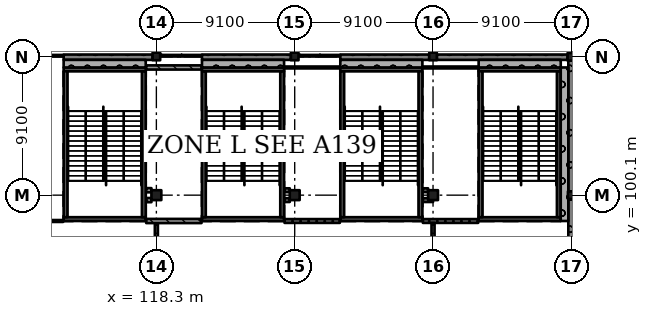
"""IFC4 building model, lengths in metres.
Left out: names, types, materials, properties, quantities, classifications, styles, units other than length and angle.
Written with IfcOpenShell. Run it as: python <this file> out.ifc"""

import sys

from ifc_helpers import new_model, si_unit, direction, frame, frame_2d, origin, origin_2d, place, context, subcontext, project, spatial, rectangle, extrude, element, fill, save


model = new_model("IFC4")
c1 = context("Model", 3, precision=1e-05, world=origin(), true_north=direction((0.0, 1.0)))
c2 = subcontext(c1, "Body", "Model", "MODEL_VIEW")
j1 = project(units=[si_unit("LENGTHUNIT", "METRE"), si_unit("PLANEANGLEUNIT", "RADIAN")], contexts=[c1])
p1 = place(None, origin())
s1 = spatial("IfcSite", under=j1, at=p1, CompositionType="ELEMENT")
p2 = place(p1, origin())
s2 = spatial("IfcBuilding", under=s1, at=p2, CompositionType="ELEMENT")
p3 = place(p2, frame((0.0, 0.0, 10.92)))
s3 = spatial("IfcBuildingStorey", under=s2, at=p3, CompositionType="ELEMENT", Elevation=10.92)
p4 = place(p3, frame((118.3, 100.1, 0.0), z_axis=(0.0, 0.0, 1.0), x_axis=(1.0, 0.0, 0.0)))
e1 = element("IfcColumn", 1, at=p4, inside=s3, PredefinedType="COLUMN", context=c2, shape_type="SweptSolid", body=[
    extrude(rectangle(XDim=0.65, YDim=0.65, at=origin_2d()), origin(), (0.0, 0.0, 1.0), 4.55),
])
p5 = place(p3, frame((118.3, 109.225, 0.0), z_axis=(0.0, 0.0, 1.0), x_axis=(1.0, 0.0, 0.0)))
e2 = element("IfcColumn", 2, at=p5, inside=s3, PredefinedType="COLUMN", context=c2, shape_type="SweptSolid", body=[
    extrude(rectangle(XDim=0.5, YDim=0.5, at=origin_2d()), origin(), (0.0, 0.0, 1.0), 4.55),
])
p6 = place(p3, frame((127.4, 100.1, 0.0), z_axis=(0.0, 0.0, 1.0), x_axis=(1.0, 0.0, 0.0)))
e3 = element("IfcColumn", 3, at=p6, inside=s3, PredefinedType="COLUMN", context=c2, shape_type="SweptSolid", body=[
    extrude(rectangle(XDim=0.65, YDim=0.65, at=origin_2d()), origin(), (0.0, 0.0, 1.0), 4.55),
])
p7 = place(p3, frame((127.4, 109.225, 0.0), z_axis=(0.0, 0.0, 1.0), x_axis=(1.0, 0.0, 0.0)))
e4 = element("IfcColumn", 4, at=p7, inside=s3, PredefinedType="COLUMN", context=c2, shape_type="SweptSolid", body=[
    extrude(rectangle(XDim=0.5, YDim=0.5, at=origin_2d()), origin(), (0.0, 0.0, 1.0), 4.55),
])
p8 = place(p3, frame((136.5, 100.1, 0.0), z_axis=(0.0, 0.0, 1.0), x_axis=(1.0, 0.0, 0.0)))
e5 = element("IfcColumn", 5, at=p8, inside=s3, PredefinedType="COLUMN", context=c2, shape_type="SweptSolid", body=[
    extrude(rectangle(XDim=0.65, YDim=0.65, at=origin_2d()), origin(), (0.0, 0.0, 1.0), 4.55),
])
for number, where, z_axis, x_axis in (
    (6, (136.5, 109.225, 0.0), (0.0, 0.0, 1.0), (1.0, 0.0, 0.0)),
    (7, (145.625, 100.1, 0.0), (0.0, 0.0, 1.0), (1.0, 0.0, 0.0)),
    (8, (145.6, 109.2, 0.0), (0.0, 0.0, 1.0), (1.0, 0.0, 0.0)),
):
    element("IfcColumn", number, at=place(p3, frame(where, z_axis=z_axis, x_axis=x_axis)), inside=s3, PredefinedType="COLUMN", context=c2, shape_type="SweptSolid", body=[
        extrude(rectangle(XDim=0.5, YDim=0.5, at=origin_2d()), origin(), (0.0, 0.0, 1.0), 4.55),
    ])
p9 = place(p3, frame((144.9, 98.525, 0.0), z_axis=(0.0, 0.0, 1.0), x_axis=(-1.0, 0.0, 0.0)))
e9 = element("IfcWall", 9, at=p9, inside=s3, PredefinedType="SHEAR", context=c2, shape_type="SweptSolid", body=[
    extrude(rectangle(XDim=5.4, YDim=0.25, at=frame_2d((2.7, 0.0))), origin(), (0.0, 0.0, 1.0), 4.55),
])
p10 = place(p9, frame((1.5, 0.0, 0.0)))
e10 = element("IfcOpeningElement", 10, at=p10, cuts=e9, PredefinedType="OPENING", context=c2, shape_type="SweptSolid", body=[
    extrude(rectangle(XDim=2.4, YDim=2.1, at=frame_2d((1.2, 1.05))), frame((0.0, 0.135, 0.0), z_axis=(0.0, -1.0, 0.0), x_axis=(1.0, 0.0, 0.0)), (0.0, 0.0, 1.0), 0.27),
])
p11 = place(p3, frame((144.9, 108.375, 0.0), z_axis=(0.0, 0.0, 1.0), x_axis=(-1.0, 0.0, 0.0)))
e11 = element("IfcWall", 11, at=p11, inside=s3, PredefinedType="SHEAR", context=c2, shape_type="SweptSolid", body=[
    extrude(rectangle(XDim=5.4, YDim=0.25, at=frame_2d((2.7, 0.0))), origin(), (0.0, 0.0, 1.0), 4.55),
])
for number, where, z_axis, x_axis in (
    (12, (139.625, 108.25, 0.0), (0.0, 0.0, 1.0), (0.0, -1.0, 0.0)),
    (13, (144.775, 108.25, 0.0), (0.0, 0.0, 1.0), (0.0, -1.0, 0.0)),
):
    element("IfcWall", number, at=place(p3, frame(where, z_axis=z_axis, x_axis=x_axis)), inside=s3, PredefinedType="SHEAR", context=c2, shape_type="SweptSolid", body=[
        extrude(rectangle(XDim=9.6, YDim=0.25, at=frame_2d((4.8, 0.0))), origin(), (0.0, 0.0, 1.0), 4.55),
    ])
p12 = place(p3, frame((135.8, 98.525, 0.0), z_axis=(0.0, 0.0, 1.0), x_axis=(-1.0, 0.0, 0.0)))
e14 = element("IfcWall", 14, at=p12, inside=s3, PredefinedType="SHEAR", context=c2, shape_type="SweptSolid", body=[
    extrude(rectangle(XDim=5.4, YDim=0.25, at=frame_2d((2.7, 0.0))), origin(), (0.0, 0.0, 1.0), 4.55),
])
p13 = place(p12, frame((1.5, 0.0, 0.0)))
e15 = element("IfcOpeningElement", 15, at=p13, cuts=e14, PredefinedType="OPENING", context=c2, shape_type="SweptSolid", body=[
    extrude(rectangle(XDim=2.4, YDim=2.1, at=frame_2d((1.2, 1.05))), frame((0.0, 0.135, 0.0), z_axis=(0.0, -1.0, 0.0), x_axis=(1.0, 0.0, 0.0)), (0.0, 0.0, 1.0), 0.27),
])
p14 = place(p3, frame((135.8, 108.375, 0.0), z_axis=(0.0, 0.0, 1.0), x_axis=(-1.0, 0.0, 0.0)))
e16 = element("IfcWall", 16, at=p14, inside=s3, PredefinedType="SHEAR", context=c2, shape_type="SweptSolid", body=[
    extrude(rectangle(XDim=5.4, YDim=0.25, at=frame_2d((2.7, 0.0))), origin(), (0.0, 0.0, 1.0), 4.55),
])
for number, where, z_axis, x_axis in (
    (17, (130.525, 108.25, 0.0), (0.0, 0.0, 1.0), (0.0, -1.0, 0.0)),
    (18, (135.675, 108.25, 0.0), (0.0, 0.0, 1.0), (0.0, -1.0, 0.0)),
):
    element("IfcWall", number, at=place(p3, frame(where, z_axis=z_axis, x_axis=x_axis)), inside=s3, PredefinedType="SHEAR", context=c2, shape_type="SweptSolid", body=[
        extrude(rectangle(XDim=9.6, YDim=0.25, at=frame_2d((4.8, 0.0))), origin(), (0.0, 0.0, 1.0), 4.55),
    ])
p15 = place(p3, frame((126.7, 98.525, 0.0), z_axis=(0.0, 0.0, 1.0), x_axis=(-1.0, 0.0, 0.0)))
e19 = element("IfcWall", 19, at=p15, inside=s3, PredefinedType="SHEAR", context=c2, shape_type="SweptSolid", body=[
    extrude(rectangle(XDim=5.4, YDim=0.25, at=frame_2d((2.7, 0.0))), origin(), (0.0, 0.0, 1.0), 4.55),
])
p16 = place(p15, frame((1.5, 0.0, 0.0)))
e20 = element("IfcOpeningElement", 20, at=p16, cuts=e19, PredefinedType="OPENING", context=c2, shape_type="SweptSolid", body=[
    extrude(rectangle(XDim=2.4, YDim=2.1, at=frame_2d((1.2, 1.05))), frame((0.0, 0.135, 0.0), z_axis=(0.0, -1.0, 0.0), x_axis=(1.0, 0.0, 0.0)), (0.0, 0.0, 1.0), 0.27),
])
p17 = place(p3, frame((126.7, 108.375, 0.0), z_axis=(0.0, 0.0, 1.0), x_axis=(-1.0, 0.0, 0.0)))
e21 = element("IfcWall", 21, at=p17, inside=s3, PredefinedType="SHEAR", context=c2, shape_type="SweptSolid", body=[
    extrude(rectangle(XDim=5.4, YDim=0.25, at=frame_2d((2.7, 0.0))), origin(), (0.0, 0.0, 1.0), 4.55),
])
for number, where, z_axis, x_axis in (
    (22, (121.425, 108.25, 0.0), (0.0, 0.0, 1.0), (0.0, -1.0, 0.0)),
    (23, (126.575, 108.25, 0.0), (0.0, 0.0, 1.0), (0.0, -1.0, 0.0)),
):
    element("IfcWall", number, at=place(p3, frame(where, z_axis=z_axis, x_axis=x_axis)), inside=s3, PredefinedType="SHEAR", context=c2, shape_type="SweptSolid", body=[
        extrude(rectangle(XDim=9.6, YDim=0.25, at=frame_2d((4.8, 0.0))), origin(), (0.0, 0.0, 1.0), 4.55),
    ])
p18 = place(p3, frame((117.6, 98.525, 0.0), z_axis=(0.0, 0.0, 1.0), x_axis=(-1.0, 0.0, 0.0)))
e24 = element("IfcWall", 24, at=p18, inside=s3, PredefinedType="SHEAR", context=c2, shape_type="SweptSolid", body=[
    extrude(rectangle(XDim=5.4, YDim=0.25, at=frame_2d((2.7, 0.0))), origin(), (0.0, 0.0, 1.0), 4.55),
])
p19 = place(p18, frame((1.5, 0.0, 0.0)))
e25 = element("IfcOpeningElement", 25, at=p19, cuts=e24, PredefinedType="OPENING", context=c2, shape_type="SweptSolid", body=[
    extrude(rectangle(XDim=2.4, YDim=2.1, at=frame_2d((1.2, 1.05))), frame((0.0, 0.135, 0.0), z_axis=(0.0, -1.0, 0.0), x_axis=(1.0, 0.0, 0.0)), (0.0, 0.0, 1.0), 0.27),
])
p20 = place(p3, frame((117.6, 108.375, 0.0), z_axis=(0.0, 0.0, 1.0), x_axis=(-1.0, 0.0, 0.0)))
e26 = element("IfcWall", 26, at=p20, inside=s3, PredefinedType="SHEAR", context=c2, shape_type="SweptSolid", body=[
    extrude(rectangle(XDim=5.4, YDim=0.25, at=frame_2d((2.7, 0.0))), origin(), (0.0, 0.0, 1.0), 4.55),
])
for number, where, z_axis, x_axis in (
    (27, (112.325, 108.25, 0.0), (0.0, 0.0, 1.0), (0.0, -1.0, 0.0)),
    (28, (117.475, 108.25, 0.0), (0.0, 0.0, 1.0), (0.0, -1.0, 0.0)),
):
    element("IfcWall", number, at=place(p3, frame(where, z_axis=z_axis, x_axis=x_axis)), inside=s3, PredefinedType="SHEAR", context=c2, shape_type="SweptSolid", body=[
        extrude(rectangle(XDim=9.6, YDim=0.25, at=frame_2d((4.8, 0.0))), origin(), (0.0, 0.0, 1.0), 4.55),
    ])
p21 = place(p3, frame((145.575, 91.275, 0.0), z_axis=(0.0, 0.0, 1.0), x_axis=(0.0, 1.0, 0.0)))
e29 = element("IfcWall", 29, at=p21, inside=s3, PredefinedType="SOLIDWALL", context=c2, shape_type="SweptSolid", body=[
    extrude(rectangle(XDim=8.575, YDim=0.35, at=frame_2d((4.288, 0.0))), origin(), (0.0, 0.0, 1.0), 3.5),
])
p22 = place(p3, frame((145.575, 100.35, 0.0), z_axis=(0.0, 0.0, 1.0), x_axis=(0.0, 1.0, 0.0)))
e30 = element("IfcWall", 30, at=p22, inside=s3, PredefinedType="SOLIDWALL", context=c2, shape_type="SweptSolid", body=[
    extrude(rectangle(XDim=8.6, YDim=0.35, at=frame_2d((4.3, 0.0))), origin(), (0.0, 0.0, 1.0), 3.5),
])
p23 = place(p3, frame((145.35, 109.175, 0.0), z_axis=(0.0, 0.0, 1.0), x_axis=(-1.0, 0.0, 0.0)))
e31 = element("IfcWall", 31, at=p23, inside=s3, PredefinedType="SOLIDWALL", context=c2, shape_type="SweptSolid", body=[
    extrude(rectangle(XDim=8.6, YDim=0.35, at=frame_2d((4.3, 0.0))), origin(), (0.0, 0.0, 1.0), 3.5),
])
p24 = place(p3, frame((136.25, 109.175, 0.0), z_axis=(0.0, 0.0, 1.0), x_axis=(-1.0, 0.0, 0.0)))
e32 = element("IfcWall", 32, at=p24, inside=s3, PredefinedType="SOLIDWALL", context=c2, shape_type="SweptSolid", body=[
    extrude(rectangle(XDim=5.85, YDim=0.35, at=frame_2d((2.925, 0.0))), origin(), (0.0, 0.0, 1.0), 3.5),
])
p25 = place(p3, frame((127.15, 109.175, 0.0), z_axis=(0.0, 0.0, 1.0), x_axis=(-1.0, 0.0, 0.0)))
e33 = element("IfcWall", 33, at=p25, inside=s3, PredefinedType="SOLIDWALL", context=c2, shape_type="SweptSolid", body=[
    extrude(rectangle(XDim=5.85, YDim=0.35, at=frame_2d((2.925, 0.0))), origin(), (0.0, 0.0, 1.0), 3.5),
])
p26 = place(p3, frame((118.05, 109.175, 0.0), z_axis=(0.0, 0.0, 1.0), x_axis=(-1.0, 0.0, 0.0)))
e34 = element("IfcWall", 34, at=p26, inside=s3, PredefinedType="SOLIDWALL", context=c2, shape_type="SweptSolid", body=[
    extrude(rectangle(XDim=5.85, YDim=0.35, at=frame_2d((2.925, 0.0))), origin(), (0.0, 0.0, 1.0), 3.5),
])
p27 = place(p3, frame((139.5, 108.75, 0.0), z_axis=(0.0, 0.0, 1.0), x_axis=(1.0, 0.0, 0.0)))
e35 = element("IfcWall", 35, at=p27, inside=s3, PredefinedType="SOLIDWALL", context=c2, shape_type="SweptSolid", body=[
    extrude(rectangle(XDim=5.4, YDim=0.5, at=frame_2d((2.7, 0.0))), origin(), (0.0, 0.0, 1.0), 4.55),
])
p28 = place(p3, frame((145.15, 98.4, 0.0), z_axis=(0.0, 0.0, 1.0), x_axis=(0.0, 1.0, 0.0)))
e36 = element("IfcWall", 36, at=p28, inside=s3, PredefinedType="SOLIDWALL", context=c2, shape_type="SweptSolid", body=[
    extrude(rectangle(XDim=10.1, YDim=0.5, at=frame_2d((5.05, 0.0))), origin(), (0.0, 0.0, 1.0), 4.55),
])
p29 = place(p3, frame((130.4, 108.75, 0.0), z_axis=(0.0, 0.0, 1.0), x_axis=(1.0, 0.0, 0.0)))
e37 = element("IfcWall", 37, at=p29, inside=s3, PredefinedType="SOLIDWALL", context=c2, shape_type="SweptSolid", body=[
    extrude(rectangle(XDim=5.4, YDim=0.5, at=frame_2d((2.7, 0.0))), origin(), (0.0, 0.0, 1.0), 4.55),
])
p30 = place(p3, frame((121.3, 108.75, 0.0), z_axis=(0.0, 0.0, 1.0), x_axis=(1.0, 0.0, 0.0)))
e38 = element("IfcWall", 38, at=p30, inside=s3, PredefinedType="SOLIDWALL", context=c2, shape_type="SweptSolid", body=[
    extrude(rectangle(XDim=5.4, YDim=0.5, at=frame_2d((2.7, 0.0))), origin(), (0.0, 0.0, 1.0), 4.55),
])
p31 = place(p3, frame((112.2, 108.75, 0.0), z_axis=(0.0, 0.0, 1.0), x_axis=(1.0, 0.0, 0.0)))
e39 = element("IfcWall", 39, at=p31, inside=s3, PredefinedType="SOLIDWALL", context=c2, shape_type="SweptSolid", body=[
    extrude(rectangle(XDim=5.4, YDim=0.5, at=frame_2d((2.7, 0.0))), origin(), (0.0, 0.0, 1.0), 4.55),
])
p32 = place(p3, frame((109.512, 98.4, 0.0), z_axis=(0.0, 0.0, 1.0), x_axis=(1.0, 0.0, 0.0)))
e40 = element("IfcWall", 40, at=p32, inside=s3, PredefinedType="PARTITIONING", context=c2, shape_type="SweptSolid", body=[
    extrude(rectangle(XDim=2.657, YDim=0.125, at=frame_2d((1.329, 0.0))), origin(), (0.0, 0.0, 1.0), 4.25),
])
p33 = place(p3, frame((117.63, 98.4, 0.0), z_axis=(0.0, 0.0, 1.0), x_axis=(1.0, 0.0, 0.0)))
e41 = element("IfcWall", 41, at=p33, inside=s3, PredefinedType="SOLIDWALL", context=c2, shape_type="SweptSolid", body=[
    extrude(rectangle(XDim=3.64, YDim=0.275, at=frame_2d((1.82, 0.0))), origin(), (0.0, 0.0, 1.0), 4.25),
])
p34 = place(p33, frame((1.52, 0.0, 0.0)))
e42 = element("IfcOpeningElement", 42, at=p34, cuts=e41, PredefinedType="OPENING", context=c2, shape_type="SweptSolid", body=[
    extrude(rectangle(XDim=1.2, YDim=2.4, at=frame_2d((0.6, 1.2))), frame((0.0, 0.147, 0.0), z_axis=(0.0, -1.0, 0.0), x_axis=(1.0, 0.0, 0.0)), (0.0, 0.0, 1.0), 0.295),
])
p35 = place(p3, frame((117.63, 99.775, 0.0), z_axis=(0.0, 0.0, 1.0), x_axis=(1.0, 0.0, 0.0)))
e43 = element("IfcWall", 43, at=p35, inside=s3, PredefinedType="SOLIDWALL", context=c2, shape_type="SweptSolid", body=[
    extrude(rectangle(XDim=0.345, YDim=0.275, at=frame_2d((0.173, 0.0))), origin(), (0.0, 0.0, 1.0), 4.25),
])
p36 = place(p3, frame((117.63, 108.5, 0.0), z_axis=(0.0, 0.0, 1.0), x_axis=(1.0, 0.0, 0.0)))
e44 = element("IfcWall", 44, at=p36, inside=s3, PredefinedType="SOLIDWALL", context=c2, shape_type="SweptSolid", body=[
    extrude(rectangle(XDim=3.64, YDim=0.275, at=frame_2d((1.82, 0.0))), origin(), (0.0, 0.0, 1.0), 4.25),
])
p37 = place(p3, frame((117.975, 100.425, 0.0), z_axis=(0.0, 0.0, 1.0), x_axis=(-1.0, 0.0, 0.0)))
e45 = element("IfcWall", 45, at=p37, inside=s3, PredefinedType="SOLIDWALL", context=c2, shape_type="SweptSolid", body=[
    extrude(rectangle(XDim=0.345, YDim=0.275, at=frame_2d((0.173, 0.0))), origin(), (0.0, 0.0, 1.0), 4.25),
])
p38 = place(p3, frame((118.3, 91.4, 0.0), z_axis=(0.0, 0.0, 1.0), x_axis=(0.0, 1.0, 0.0)))
e46 = element("IfcWall", 46, at=p38, inside=s3, PredefinedType="PARTITIONING", context=c2, shape_type="SweptSolid", body=[
    extrude(rectangle(XDim=6.863, YDim=0.2, at=frame_2d((3.431, 0.0))), origin(), (0.0, 0.0, 1.0), 3.55),
])
p39 = place(p38, frame((0.85, 0.0, 0.0)))
e47 = element("IfcOpeningElement", 47, at=p39, cuts=e46, PredefinedType="OPENING", context=c2, shape_type="SweptSolid", body=[
    extrude(rectangle(XDim=1.8, YDim=2.4, at=frame_2d((0.9, 1.2))), frame((0.0, 0.11, 0.0), z_axis=(0.0, -1.0, 0.0), x_axis=(1.0, 0.0, 0.0)), (0.0, 0.0, 1.0), 0.22),
])
p40 = place(p38, frame((4.25, 0.0, 0.0)))
e48 = element("IfcOpeningElement", 48, at=p40, cuts=e46, PredefinedType="OPENING", context=c2, shape_type="SweptSolid", body=[
    extrude(rectangle(XDim=1.8, YDim=2.4, at=frame_2d((0.9, 1.2))), frame((0.0, 0.11, 0.0), z_axis=(0.0, -1.0, 0.0), x_axis=(1.0, 0.0, 0.0)), (0.0, 0.0, 1.0), 0.22),
])
p41 = place(p3, frame((126.73, 98.4, 0.0), z_axis=(0.0, 0.0, 1.0), x_axis=(1.0, 0.0, 0.0)))
e49 = element("IfcWall", 49, at=p41, inside=s3, PredefinedType="SOLIDWALL", context=c2, shape_type="SweptSolid", body=[
    extrude(rectangle(XDim=3.64, YDim=0.25, at=frame_2d((1.82, 0.0))), origin(), (0.0, 0.0, 1.0), 4.25),
])
p42 = place(p41, frame((1.35, 0.0, 0.0)))
e50 = element("IfcOpeningElement", 50, at=p42, cuts=e49, PredefinedType="OPENING", context=c2, shape_type="SweptSolid", body=[
    extrude(rectangle(XDim=1.0, YDim=2.1, at=frame_2d((0.5, 1.05))), frame((0.0, 0.135, 0.0), z_axis=(0.0, -1.0, 0.0), x_axis=(1.0, 0.0, 0.0)), (0.0, 0.0, 1.0), 0.27),
])
p43 = place(p3, frame((126.73, 99.775, 0.0), z_axis=(0.0, 0.0, 1.0), x_axis=(1.0, 0.0, 0.0)))
e51 = element("IfcWall", 51, at=p43, inside=s3, PredefinedType="SOLIDWALL", context=c2, shape_type="SweptSolid", body=[
    extrude(rectangle(XDim=0.345, YDim=0.25, at=frame_2d((0.172, 0.0))), origin(), (0.0, 0.0, 1.0), 4.25),
])
p44 = place(p3, frame((126.73, 108.5, 0.0), z_axis=(0.0, 0.0, 1.0), x_axis=(1.0, 0.0, 0.0)))
e52 = element("IfcWall", 52, at=p44, inside=s3, PredefinedType="PARTITIONING", context=c2, shape_type="SweptSolid", body=[
    extrude(rectangle(XDim=3.64, YDim=0.125, at=frame_2d((1.82, 0.0))), origin(), (0.0, 0.0, 1.0), 4.25),
])
p45 = place(p3, frame((127.075, 100.425, 0.0), z_axis=(0.0, 0.0, 1.0), x_axis=(-1.0, 0.0, 0.0)))
e53 = element("IfcWall", 53, at=p45, inside=s3, PredefinedType="SOLIDWALL", context=c2, shape_type="SweptSolid", body=[
    extrude(rectangle(XDim=0.345, YDim=0.25, at=frame_2d((0.172, 0.0))), origin(), (0.0, 0.0, 1.0), 4.25),
])
p46 = place(p3, frame((135.83, 98.4, 0.0), z_axis=(0.0, 0.0, 1.0), x_axis=(1.0, 0.0, 0.0)))
e54 = element("IfcWall", 54, at=p46, inside=s3, PredefinedType="SOLIDWALL", context=c2, shape_type="SweptSolid", body=[
    extrude(rectangle(XDim=3.64, YDim=0.25, at=frame_2d((1.82, 0.0))), origin(), (0.0, 0.0, 1.0), 4.25),
])
p47 = place(p46, frame((1.72, 0.0, 0.0)))
e55 = element("IfcOpeningElement", 55, at=p47, cuts=e54, PredefinedType="OPENING", context=c2, shape_type="SweptSolid", body=[
    extrude(rectangle(XDim=0.8, YDim=2.1, at=frame_2d((0.4, 1.05))), frame((0.0, 0.135, 0.0), z_axis=(0.0, -1.0, 0.0), x_axis=(1.0, 0.0, 0.0)), (0.0, 0.0, 1.0), 0.27),
])
p48 = place(p3, frame((135.83, 99.775, 0.0), z_axis=(0.0, 0.0, 1.0), x_axis=(1.0, 0.0, 0.0)))
e56 = element("IfcWall", 56, at=p48, inside=s3, PredefinedType="SOLIDWALL", context=c2, shape_type="SweptSolid", body=[
    extrude(rectangle(XDim=0.67, YDim=0.25, at=frame_2d((0.335, 0.0))), origin(), (0.0, 0.0, 1.0), 4.25),
])
p49 = place(p3, frame((135.83, 108.5, 0.0), z_axis=(0.0, 0.0, 1.0), x_axis=(1.0, 0.0, 0.0)))
e57 = element("IfcWall", 57, at=p49, inside=s3, PredefinedType="PARTITIONING", context=c2, shape_type="SweptSolid", body=[
    extrude(rectangle(XDim=3.64, YDim=0.125, at=frame_2d((1.82, 0.0))), origin(), (0.0, 0.0, 1.0), 4.25),
])
p50 = place(p3, frame((136.175, 100.425, 0.0), z_axis=(0.0, 0.0, 1.0), x_axis=(-1.0, 0.0, 0.0)))
e58 = element("IfcWall", 58, at=p50, inside=s3, PredefinedType="SOLIDWALL", context=c2, shape_type="SweptSolid", body=[
    extrude(rectangle(XDim=0.345, YDim=0.25, at=frame_2d((0.172, 0.0))), origin(), (0.0, 0.0, 1.0), 4.25),
])
p51 = place(p3, frame((136.5, 91.375, 0.0), z_axis=(0.0, 0.0, 1.0), x_axis=(0.0, 1.0, 0.0)))
e59 = element("IfcWall", 59, at=p51, inside=s3, PredefinedType="PARTITIONING", context=c2, shape_type="SweptSolid", body=[
    extrude(rectangle(XDim=6.9, YDim=0.2, at=frame_2d((3.45, 0.0))), origin(), (0.0, 0.0, 1.0), 3.55),
])
p52 = place(p51, frame((0.85, 0.0, 0.0)))
e60 = element("IfcOpeningElement", 60, at=p52, cuts=e59, PredefinedType="OPENING", context=c2, shape_type="SweptSolid", body=[
    extrude(rectangle(XDim=1.8, YDim=2.4, at=frame_2d((0.9, 1.2))), frame((0.0, 0.11, 0.0), z_axis=(0.0, -1.0, 0.0), x_axis=(1.0, 0.0, 0.0)), (0.0, 0.0, 1.0), 0.22),
])
p53 = place(p51, frame((4.25, 0.0, 0.0)))
e61 = element("IfcOpeningElement", 61, at=p53, cuts=e59, PredefinedType="OPENING", context=c2, shape_type="SweptSolid", body=[
    extrude(rectangle(XDim=1.8, YDim=2.4, at=frame_2d((0.9, 1.2))), frame((0.0, 0.11, 0.0), z_axis=(0.0, -1.0, 0.0), x_axis=(1.0, 0.0, 0.0)), (0.0, 0.0, 1.0), 0.22),
])
p54 = place(p47, origin())
e62 = element("IfcDoor", 62, at=p54, inside=s3, OperationType="SINGLE_SWING_RIGHT", PredefinedType="DOOR", context=c2, shape_type="SweptSolid", body=[
    extrude(rectangle(XDim=0.8, YDim=2.1, at=frame_2d((0.4, 1.05))), frame((0.0, 0.025, 0.0), z_axis=(0.0, -1.0, 0.0), x_axis=(1.0, 0.0, 0.0)), (0.0, 0.0, 1.0), 0.05),
])
fill(e55, e62)
p55 = place(p42, origin())
e63 = element("IfcDoor", 63, at=p55, inside=s3, OperationType="SINGLE_SWING_LEFT", PredefinedType="DOOR", context=c2, shape_type="SweptSolid", body=[
    extrude(rectangle(XDim=1.0, YDim=2.1, at=frame_2d((0.5, 1.05))), frame((0.0, 0.025, 0.0), z_axis=(0.0, -1.0, 0.0), x_axis=(1.0, 0.0, 0.0)), (0.0, 0.0, 1.0), 0.05),
])
fill(e50, e63)
p56 = place(p34, origin())
e64 = element("IfcDoor", 64, at=p56, inside=s3, OperationType="SINGLE_SWING_RIGHT", PredefinedType="DOOR", context=c2, shape_type="SweptSolid", body=[
    extrude(rectangle(XDim=1.2, YDim=2.4, at=frame_2d((0.6, 1.2))), frame((0.0, 0.025, 0.0), z_axis=(0.0, -1.0, 0.0), x_axis=(1.0, 0.0, 0.0)), (0.0, 0.0, 1.0), 0.05),
])
fill(e42, e64)
p57 = place(p53, origin())
e65 = element("IfcDoor", 65, at=p57, inside=s3, OperationType="DOUBLE_DOOR_SINGLE_SWING", PredefinedType="DOOR", context=c2, shape_type="SweptSolid", body=[
    extrude(rectangle(XDim=1.8, YDim=2.4, at=frame_2d((0.9, 1.2))), frame((0.0, 0.025, 0.0), z_axis=(0.0, -1.0, 0.0), x_axis=(1.0, 0.0, 0.0)), (0.0, 0.0, 1.0), 0.05),
])
fill(e61, e65)
p58 = place(p40, origin())
e66 = element("IfcDoor", 66, at=p58, inside=s3, OperationType="DOUBLE_DOOR_SINGLE_SWING", PredefinedType="DOOR", context=c2, shape_type="SweptSolid", body=[
    extrude(rectangle(XDim=1.8, YDim=2.4, at=frame_2d((0.9, 1.2))), frame((0.0, 0.025, 0.0), z_axis=(0.0, -1.0, 0.0), x_axis=(1.0, 0.0, 0.0)), (0.0, 0.0, 1.0), 0.05),
])
fill(e48, e66)
p59 = place(p10, origin())
e67 = element("IfcDoor", 67, at=p59, inside=s3, OperationType="DOUBLE_DOOR_SINGLE_SWING", PredefinedType="DOOR", context=c2, shape_type="SweptSolid", body=[
    extrude(rectangle(XDim=2.4, YDim=2.1, at=frame_2d((1.2, 1.05))), frame((0.0, 0.025, 0.0), z_axis=(0.0, -1.0, 0.0), x_axis=(1.0, 0.0, 0.0)), (0.0, 0.0, 1.0), 0.05),
])
fill(e10, e67)
p60 = place(p13, origin())
e68 = element("IfcDoor", 68, at=p60, inside=s3, OperationType="DOUBLE_DOOR_SINGLE_SWING", PredefinedType="DOOR", context=c2, shape_type="SweptSolid", body=[
    extrude(rectangle(XDim=2.4, YDim=2.1, at=frame_2d((1.2, 1.05))), frame((0.0, 0.025, 0.0), z_axis=(0.0, -1.0, 0.0), x_axis=(1.0, 0.0, 0.0)), (0.0, 0.0, 1.0), 0.05),
])
fill(e15, e68)
p61 = place(p16, origin())
e69 = element("IfcDoor", 69, at=p61, inside=s3, OperationType="DOUBLE_DOOR_SINGLE_SWING", PredefinedType="DOOR", context=c2, shape_type="SweptSolid", body=[
    extrude(rectangle(XDim=2.4, YDim=2.1, at=frame_2d((1.2, 1.05))), frame((0.0, 0.025, 0.0), z_axis=(0.0, -1.0, 0.0), x_axis=(1.0, 0.0, 0.0)), (0.0, 0.0, 1.0), 0.05),
])
fill(e20, e69)
p62 = place(p19, origin())
e70 = element("IfcDoor", 70, at=p62, inside=s3, OperationType="DOUBLE_DOOR_SINGLE_SWING", PredefinedType="DOOR", context=c2, shape_type="SweptSolid", body=[
    extrude(rectangle(XDim=2.4, YDim=2.1, at=frame_2d((1.2, 1.05))), frame((0.0, 0.025, 0.0), z_axis=(0.0, -1.0, 0.0), x_axis=(1.0, 0.0, 0.0)), (0.0, 0.0, 1.0), 0.05),
])
fill(e25, e70)
save(model, sys.argv[1])
